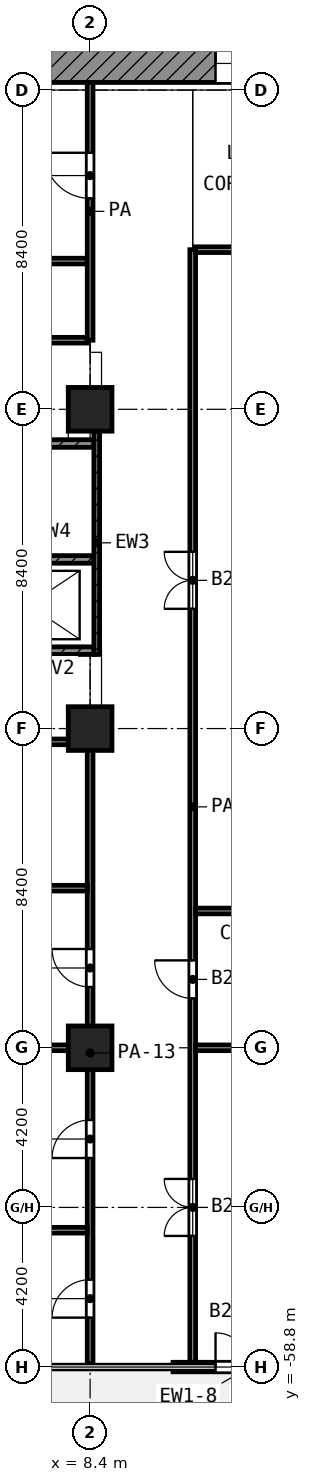
"""IFC4 building model, lengths in metres.
Left out: names, types, materials, properties, quantities, classifications, styles, units other than length and angle.
Written with IfcOpenShell. Run it as: python <this file> out.ifc"""

import sys

from ifc_helpers import new_model, si_unit, direction, frame, frame_2d, origin, origin_2d, place, context, subcontext, project, spatial, rectangle, extrude, element, fill, save


model = new_model("IFC4")
c1 = context("Model", 3, precision=1e-05, world=origin(), true_north=direction((0.0, 1.0)))
c2 = subcontext(c1, "Body", "Model", "MODEL_VIEW")
j1 = project(units=[si_unit("LENGTHUNIT", "METRE"), si_unit("PLANEANGLEUNIT", "RADIAN")], contexts=[c1])
p1 = place(None, origin())
s1 = spatial("IfcSite", under=j1, at=p1, CompositionType="ELEMENT")
p2 = place(p1, origin())
s2 = spatial("IfcBuilding", under=s1, at=p2, CompositionType="ELEMENT")
p3 = place(p2, frame((0.0, 0.0, 98.8)))
s3 = spatial("IfcBuildingStorey", under=s2, at=p3, CompositionType="ELEMENT", Elevation=98.8)
for number, where, z_axis, x_axis in (
    (1, (8.4, -33.6, 0.0), (0.0, 0.0, 1.0), (1.0, 0.0, 0.0)),
    (2, (8.4, -42.0, 0.0), (0.0, 0.0, 1.0), (1.0, 0.0, 0.0)),
    (3, (8.4, -50.4, 0.0), (0.0, 0.0, 1.0), (1.0, 0.0, 0.0)),
):
    element("IfcColumn", number, at=place(p3, frame(where, z_axis=z_axis, x_axis=x_axis)), inside=s3, PredefinedType="COLUMN", context=c2, shape_type="SweptSolid", body=[
        extrude(rectangle(XDim=1.15, YDim=1.15, at=origin_2d()), origin(), (0.0, 0.0, 1.0), 4.2),
    ])
p4 = place(p3, frame((10.583, -58.8, 0.0), z_axis=(0.0, 0.0, 1.0), x_axis=(1.0, 0.0, 0.0)))
e4 = element("IfcWall", 4, at=p4, inside=s3, PredefinedType="SOLIDWALL", context=c2, shape_type="SweptSolid", body=[
    extrude(rectangle(XDim=4.033, YDim=0.25, at=frame_2d((2.017, 0.0))), origin(), (0.0, 0.0, 1.0), 2.58),
])
p5 = place(p4, frame((1.117, 0.0, 0.0)))
e5 = element("IfcOpeningElement", 5, at=p5, cuts=e4, PredefinedType="OPENING", context=c2, shape_type="SweptSolid", body=[
    extrude(rectangle(XDim=1.8, YDim=2.1, at=frame_2d((0.9, 1.05))), frame((0.0, 0.135, 0.0), z_axis=(0.0, -1.0, 0.0), x_axis=(1.0, 0.0, 0.0)), (0.0, 0.0, 1.0), 0.27),
])
p6 = place(p3, frame((5.4, -24.5, 0.0), z_axis=(0.0, 0.0, 1.0), x_axis=(1.0, 0.0, 0.0)))
e6 = element("IfcWall", 6, at=p6, inside=s3, PredefinedType="SHEAR", context=c2, shape_type="SweptSolid", body=[
    extrude(rectangle(XDim=18.6, YDim=1.0, at=frame_2d((9.3, 0.0))), origin(), (0.0, 0.0, 1.0), 3.6),
])
p7 = place(p6, frame((6.3, 0.0, 0.0)))
e7 = element("IfcOpeningElement", 7, at=p7, cuts=e6, PredefinedType="OPENING", context=c2, shape_type="SweptSolid", body=[
    extrude(rectangle(XDim=1.8, YDim=2.1, at=frame_2d((0.9, 1.05))), frame((0.0, 0.51, 0.0), z_axis=(0.0, -1.0, 0.0), x_axis=(1.0, 0.0, 0.0)), (0.0, 0.0, 1.0), 1.02),
])
p8 = place(p3, frame((8.575, -40.05, 0.0), z_axis=(0.0, 0.0, 1.0), x_axis=(0.0, 1.0, 0.0)))
e8 = element("IfcWall", 8, at=p8, inside=s3, PredefinedType="SHEAR", context=c2, shape_type="SweptSolid", body=[
    extrude(rectangle(XDim=5.875, YDim=0.15, at=frame_2d((2.938, 0.0))), origin(), (0.0, 0.0, 1.0), 3.6),
])
p9 = place(p3, frame((0.45, -34.5, 0.0), z_axis=(0.0, 0.0, 1.0), x_axis=(1.0, 0.0, 0.0)))
e9 = element("IfcWall", 9, at=p9, inside=s3, PredefinedType="SHEAR", context=c2, shape_type="SweptSolid", body=[
    extrude(rectangle(XDim=8.05, YDim=0.2, at=frame_2d((4.025, 0.0))), origin(), (0.0, 0.0, 1.0), 3.6),
])
p10 = place(p9, frame((0.75, 0.0, 0.0)))
e10 = element("IfcOpeningElement", 10, at=p10, cuts=e9, PredefinedType="OPENING", context=c2, shape_type="SweptSolid", body=[
    extrude(rectangle(XDim=1.1, YDim=2.1, at=frame_2d((0.55, 1.05))), frame((0.0, 0.11, 0.0), z_axis=(0.0, -1.0, 0.0), x_axis=(1.0, 0.0, 0.0)), (0.0, 0.0, 1.0), 0.22),
])
p11 = place(p3, frame((0.45, -37.55, 0.0), z_axis=(0.0, 0.0, 1.0), x_axis=(1.0, 0.0, 0.0)))
e11 = element("IfcWall", 11, at=p11, inside=s3, PredefinedType="SHEAR", context=c2, shape_type="SweptSolid", body=[
    extrude(rectangle(XDim=8.05, YDim=0.2, at=frame_2d((4.025, 0.0))), origin(), (0.0, 0.0, 1.0), 3.6),
])
p12 = place(p11, frame((0.1, 0.0, 0.0)))
e12 = element("IfcOpeningElement", 12, at=p12, cuts=e11, PredefinedType="OPENING", context=c2, shape_type="SweptSolid", body=[
    extrude(rectangle(XDim=1.1, YDim=2.1, at=frame_2d((0.55, 1.05))), frame((0.0, 0.11, 0.0), z_axis=(0.0, -1.0, 0.0), x_axis=(1.0, 0.0, 0.0)), (0.0, 0.0, 1.0), 0.22),
])
p13 = place(p3, frame((0.45, -39.95, 0.0), z_axis=(0.0, 0.0, 1.0), x_axis=(1.0, 0.0, 0.0)))
e13 = element("IfcWall", 13, at=p13, inside=s3, PredefinedType="SHEAR", context=c2, shape_type="SweptSolid", body=[
    extrude(rectangle(XDim=8.05, YDim=0.2, at=frame_2d((4.025, 0.0))), origin(), (0.0, 0.0, 1.0), 3.6),
])
p14 = place(p13, frame((2.0, 0.0, 0.0)))
e14 = element("IfcOpeningElement", 14, at=p14, cuts=e13, PredefinedType="OPENING", context=c2, shape_type="SweptSolid", body=[
    extrude(rectangle(XDim=1.1, YDim=2.1, at=frame_2d((0.55, 1.05))), frame((0.0, 0.11, 0.0), z_axis=(0.0, -1.0, 0.0), x_axis=(1.0, 0.0, 0.0)), (0.0, 0.0, 1.0), 0.22),
])
p15 = place(p3, frame((2.513, -55.2, 0.0), z_axis=(0.0, 0.0, 1.0), x_axis=(1.0, 0.0, 0.0)))
e15 = element("IfcWall", 15, at=p15, inside=s3, PredefinedType="PARTITIONING", context=c2, shape_type="SweptSolid", body=[
    extrude(rectangle(XDim=5.812, YDim=0.15, at=frame_2d((2.906, 0.0))), origin(), (0.0, 0.0, 1.0), 2.7),
])
p16 = place(p3, frame((0.08, -50.4, 0.0), z_axis=(0.0, 0.0, 1.0), x_axis=(1.0, 0.0, 0.0)))
e16 = element("IfcWall", 16, at=p16, inside=s3, PredefinedType="PARTITIONING", context=c2, shape_type="SweptSolid", body=[
    extrude(rectangle(XDim=8.245, YDim=0.15, at=frame_2d((4.123, 0.0))), origin(), (0.0, 0.0, 1.0), 3.6),
])
for number, where, z_axis, x_axis in (
    (17, (11.175, -50.4, 0.0), (0.0, 0.0, 1.0), (1.0, 0.0, 0.0)),
    (18, (11.175, -46.8, 0.0), (0.0, 0.0, 1.0), (1.0, 0.0, 0.0)),
):
    element("IfcWall", number, at=place(p3, frame(where, z_axis=z_axis, x_axis=x_axis)), inside=s3, PredefinedType="PARTITIONING", context=c2, shape_type="SweptSolid", body=[
        extrude(rectangle(XDim=5.545, YDim=0.15, at=frame_2d((2.772, 0.0))), origin(), (0.0, 0.0, 1.0), 3.6),
    ])
p17 = place(p3, frame((0.08, -46.2, 0.0), z_axis=(0.0, 0.0, 1.0), x_axis=(1.0, 0.0, 0.0)))
e19 = element("IfcWall", 19, at=p17, inside=s3, PredefinedType="PARTITIONING", context=c2, shape_type="SweptSolid", body=[
    extrude(rectangle(XDim=8.245, YDim=0.15, at=frame_2d((4.123, 0.0))), origin(), (0.0, 0.0, 1.0), 3.6),
])
p18 = place(p3, frame((2.327, -42.35, 0.0), z_axis=(0.0, 0.0, 1.0), x_axis=(1.0, 0.0, 0.0)))
e20 = element("IfcWall", 20, at=p18, inside=s3, PredefinedType="PARTITIONING", context=c2, shape_type="SweptSolid", body=[
    extrude(rectangle(XDim=5.998, YDim=0.15, at=frame_2d((2.999, 0.0))), origin(), (0.0, 0.0, 1.0), 3.6),
])
p19 = place(p18, frame((2.499, 0.0, 0.0)))
e21 = element("IfcOpeningElement", 21, at=p19, cuts=e20, PredefinedType="OPENING", context=c2, shape_type="SweptSolid", body=[
    extrude(rectangle(XDim=1.0, YDim=2.1, at=frame_2d((0.5, 1.05))), frame((0.0, 0.085, 0.0), z_axis=(0.0, -1.0, 0.0), x_axis=(1.0, 0.0, 0.0)), (0.0, 0.0, 1.0), 0.17),
])
p20 = place(p3, frame((0.08, -31.782, 0.0), z_axis=(0.0, 0.0, 1.0), x_axis=(1.0, 0.0, 0.0)))
e22 = element("IfcWall", 22, at=p20, inside=s3, PredefinedType="PARTITIONING", context=c2, shape_type="SweptSolid", body=[
    extrude(rectangle(XDim=8.245, YDim=0.15, at=frame_2d((4.123, 0.0))), origin(), (0.0, 0.0, 1.0), 3.6),
])
p21 = place(p20, frame((3.62, 0.0, 0.0)))
e23 = element("IfcOpeningElement", 23, at=p21, cuts=e22, PredefinedType="OPENING", context=c2, shape_type="SweptSolid", body=[
    extrude(rectangle(XDim=1.0, YDim=2.1, at=frame_2d((0.5, 1.05))), frame((0.0, 0.085, 0.0), z_axis=(0.0, -1.0, 0.0), x_axis=(1.0, 0.0, 0.0)), (0.0, 0.0, 1.0), 0.17),
])
p22 = place(p3, frame((0.08, -29.7, 0.0), z_axis=(0.0, 0.0, 1.0), x_axis=(1.0, 0.0, 0.0)))
e24 = element("IfcWall", 24, at=p22, inside=s3, PredefinedType="PARTITIONING", context=c2, shape_type="SweptSolid", body=[
    extrude(rectangle(XDim=8.245, YDim=0.15, at=frame_2d((4.123, 0.0))), origin(), (0.0, 0.0, 1.0), 3.6),
])
p23 = place(p3, frame((11.175, -29.4, 0.0), z_axis=(0.0, 0.0, 1.0), x_axis=(1.0, 0.0, 0.0)))
e25 = element("IfcWall", 25, at=p23, inside=s3, PredefinedType="PARTITIONING", context=c2, shape_type="SweptSolid", body=[
    extrude(rectangle(XDim=13.95, YDim=0.15, at=frame_2d((6.975, 0.0))), origin(), (0.0, 0.0, 1.0), 3.6),
])
p24 = place(p3, frame((8.4, -58.72, 0.0), z_axis=(0.0, 0.0, 1.0), x_axis=(0.0, 1.0, 0.0)))
e26 = element("IfcWall", 26, at=p24, inside=s3, PredefinedType="PARTITIONING", context=c2, shape_type="SweptSolid", body=[
    extrude(rectangle(XDim=16.37, YDim=0.15, at=frame_2d((8.185, 0.0))), origin(), (0.0, 0.0, 1.0), 2.7),
])
p25 = place(p24, frame((9.92, 0.0, 0.0)))
e27 = element("IfcOpeningElement", 27, at=p25, cuts=e26, PredefinedType="OPENING", context=c2, shape_type="SweptSolid", body=[
    extrude(rectangle(XDim=1.0, YDim=2.1, at=frame_2d((0.5, 1.05))), frame((0.0, 0.085, 0.0), z_axis=(0.0, -1.0, 0.0), x_axis=(1.0, 0.0, 0.0)), (0.0, 0.0, 1.0), 0.17),
])
p26 = place(p24, frame((5.42, 0.0, 0.0)))
e28 = element("IfcOpeningElement", 28, at=p26, cuts=e26, PredefinedType="OPENING", context=c2, shape_type="SweptSolid", body=[
    extrude(rectangle(XDim=1.0, YDim=2.1, at=frame_2d((0.5, 1.05))), frame((0.0, 0.085, 0.0), z_axis=(0.0, -1.0, 0.0), x_axis=(1.0, 0.0, 0.0)), (0.0, 0.0, 1.0), 0.17),
])
p27 = place(p24, frame((1.22, 0.0, 0.0)))
e29 = element("IfcOpeningElement", 29, at=p27, cuts=e26, PredefinedType="OPENING", context=c2, shape_type="SweptSolid", body=[
    extrude(rectangle(XDim=1.0, YDim=2.1, at=frame_2d((0.5, 1.05))), frame((0.0, 0.085, 0.0), z_axis=(0.0, -1.0, 0.0), x_axis=(1.0, 0.0, 0.0)), (0.0, 0.0, 1.0), 0.17),
])
p28 = place(p3, frame((8.4, -31.782, 0.0), z_axis=(0.0, 0.0, 1.0), x_axis=(0.0, 1.0, 0.0)))
e30 = element("IfcWall", 30, at=p28, inside=s3, PredefinedType="PARTITIONING", context=c2, shape_type="SweptSolid", body=[
    extrude(rectangle(XDim=6.782, YDim=0.15, at=frame_2d((3.391, 0.0))), origin(), (0.0, 0.0, 1.0), 3.6),
])
p29 = place(p28, frame((3.732, 0.0, 0.0)))
e31 = element("IfcOpeningElement", 31, at=p29, cuts=e30, PredefinedType="OPENING", context=c2, shape_type="SweptSolid", body=[
    extrude(rectangle(XDim=1.2, YDim=2.1, at=frame_2d((0.6, 1.05))), frame((0.0, 0.085, 0.0), z_axis=(0.0, -1.0, 0.0), x_axis=(1.0, 0.0, 0.0)), (0.0, 0.0, 1.0), 0.17),
])
p30 = place(p3, frame((11.1, -58.72, 0.0), z_axis=(0.0, 0.0, 1.0), x_axis=(0.0, 1.0, 0.0)))
e32 = element("IfcWall", 32, at=p30, inside=s3, PredefinedType="PARTITIONING", context=c2, shape_type="SweptSolid", body=[
    extrude(rectangle(XDim=29.32, YDim=0.15, at=frame_2d((14.66, 0.0))), origin(), (0.0, 0.0, 1.0), 2.7),
])
p31 = place(p30, frame((19.87, 0.0, 0.0)))
e33 = element("IfcOpeningElement", 33, at=p31, cuts=e32, PredefinedType="OPENING", context=c2, shape_type="SweptSolid", body=[
    extrude(rectangle(XDim=1.5, YDim=2.1, at=frame_2d((0.75, 1.05))), frame((0.0, 0.085, 0.0), z_axis=(0.0, -1.0, 0.0), x_axis=(1.0, 0.0, 0.0)), (0.0, 0.0, 1.0), 0.17),
])
p32 = place(p30, frame((9.62, 0.0, 0.0)))
e34 = element("IfcOpeningElement", 34, at=p32, cuts=e32, PredefinedType="OPENING", context=c2, shape_type="SweptSolid", body=[
    extrude(rectangle(XDim=1.0, YDim=2.1, at=frame_2d((0.5, 1.05))), frame((0.0, 0.085, 0.0), z_axis=(0.0, -1.0, 0.0), x_axis=(1.0, 0.0, 0.0)), (0.0, 0.0, 1.0), 0.17),
])
p33 = place(p30, frame((3.37, 0.0, 0.0)))
e35 = element("IfcOpeningElement", 35, at=p33, cuts=e32, PredefinedType="OPENING", context=c2, shape_type="SweptSolid", body=[
    extrude(rectangle(XDim=1.5, YDim=2.1, at=frame_2d((0.75, 1.05))), frame((0.0, 0.085, 0.0), z_axis=(0.0, -1.0, 0.0), x_axis=(1.0, 0.0, 0.0)), (0.0, 0.0, 1.0), 0.17),
])
p34 = place(p5, origin())
e36 = element("IfcDoor", 36, at=p34, inside=s3, OperationType="DOUBLE_DOOR_SINGLE_SWING", PredefinedType="DOOR", context=c2, shape_type="SweptSolid", body=[
    extrude(rectangle(XDim=1.8, YDim=2.1, at=frame_2d((0.9, 1.05))), frame((0.0, 0.025, 0.0), z_axis=(0.0, -1.0, 0.0), x_axis=(1.0, 0.0, 0.0)), (0.0, 0.0, 1.0), 0.05),
])
fill(e5, e36)
p35 = place(p7, origin())
e37 = element("IfcDoor", 37, at=p35, inside=s3, OperationType="DOUBLE_DOOR_SINGLE_SWING", PredefinedType="DOOR", context=c2, shape_type="SweptSolid", body=[
    extrude(rectangle(XDim=1.8, YDim=2.1, at=frame_2d((0.9, 1.05))), frame((0.0, 0.025, 0.0), z_axis=(0.0, -1.0, 0.0), x_axis=(1.0, 0.0, 0.0)), (0.0, 0.0, 1.0), 0.05),
])
fill(e7, e37)
p36 = place(p29, origin())
e38 = element("IfcDoor", 38, at=p36, inside=s3, OperationType="SINGLE_SWING_RIGHT", PredefinedType="DOOR", context=c2, shape_type="SweptSolid", body=[
    extrude(rectangle(XDim=1.2, YDim=2.1, at=frame_2d((0.6, 1.05))), frame((0.0, 0.025, 0.0), z_axis=(0.0, -1.0, 0.0), x_axis=(1.0, 0.0, 0.0)), (0.0, 0.0, 1.0), 0.05),
])
fill(e31, e38)
p37 = place(p25, origin())
e39 = element("IfcDoor", 39, at=p37, inside=s3, OperationType="SINGLE_SWING_RIGHT", PredefinedType="DOOR", context=c2, shape_type="SweptSolid", body=[
    extrude(rectangle(XDim=1.0, YDim=2.1, at=frame_2d((0.5, 1.05))), frame((0.0, 0.025, 0.0), z_axis=(0.0, -1.0, 0.0), x_axis=(1.0, 0.0, 0.0)), (0.0, 0.0, 1.0), 0.05),
])
fill(e27, e39)
p38 = place(p26, origin())
e40 = element("IfcDoor", 40, at=p38, inside=s3, OperationType="SINGLE_SWING_LEFT", PredefinedType="DOOR", context=c2, shape_type="SweptSolid", body=[
    extrude(rectangle(XDim=1.0, YDim=2.1, at=frame_2d((0.5, 1.05))), frame((0.0, 0.025, 0.0), z_axis=(0.0, -1.0, 0.0), x_axis=(1.0, 0.0, 0.0)), (0.0, 0.0, 1.0), 0.05),
])
fill(e28, e40)
p39 = place(p27, origin())
e41 = element("IfcDoor", 41, at=p39, inside=s3, OperationType="SINGLE_SWING_LEFT", PredefinedType="DOOR", context=c2, shape_type="SweptSolid", body=[
    extrude(rectangle(XDim=1.0, YDim=2.1, at=frame_2d((0.5, 1.05))), frame((0.0, 0.025, 0.0), z_axis=(0.0, -1.0, 0.0), x_axis=(1.0, 0.0, 0.0)), (0.0, 0.0, 1.0), 0.05),
])
fill(e29, e41)
p40 = place(p31, origin())
e42 = element("IfcDoor", 42, at=p40, inside=s3, OperationType="DOUBLE_DOOR_SINGLE_SWING", PredefinedType="DOOR", context=c2, shape_type="SweptSolid", body=[
    extrude(rectangle(XDim=1.5, YDim=2.1, at=frame_2d((0.75, 1.05))), frame((0.0, 0.025, 0.0), z_axis=(0.0, -1.0, 0.0), x_axis=(1.0, 0.0, 0.0)), (0.0, 0.0, 1.0), 0.05),
])
fill(e33, e42)
p41 = place(p32, origin())
e43 = element("IfcDoor", 43, at=p41, inside=s3, OperationType="SINGLE_SWING_RIGHT", PredefinedType="DOOR", context=c2, shape_type="SweptSolid", body=[
    extrude(rectangle(XDim=1.0, YDim=2.1, at=frame_2d((0.5, 1.05))), frame((0.0, 0.025, 0.0), z_axis=(0.0, -1.0, 0.0), x_axis=(1.0, 0.0, 0.0)), (0.0, 0.0, 1.0), 0.05),
])
fill(e34, e43)
p42 = place(p33, origin())
e44 = element("IfcDoor", 44, at=p42, inside=s3, OperationType="DOUBLE_DOOR_SINGLE_SWING", PredefinedType="DOOR", context=c2, shape_type="SweptSolid", body=[
    extrude(rectangle(XDim=1.5, YDim=2.1, at=frame_2d((0.75, 1.05))), frame((0.0, 0.025, 0.0), z_axis=(0.0, -1.0, 0.0), x_axis=(1.0, 0.0, 0.0)), (0.0, 0.0, 1.0), 0.05),
])
fill(e35, e44)
save(model, sys.argv[1])
